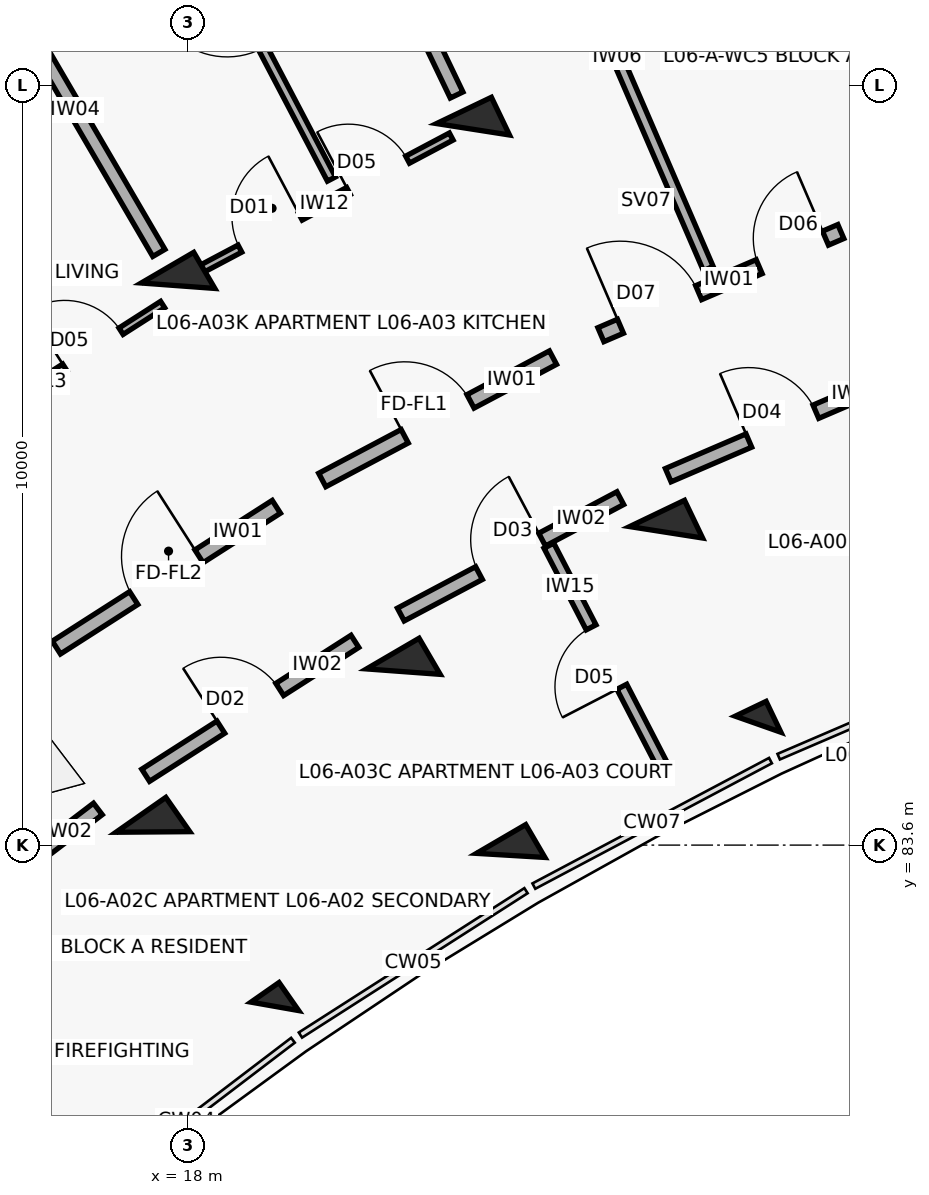
"""IFC4 building model, lengths in metres.
Left out: names, types, materials, properties, quantities, classifications, styles, units other than length and angle.
Written with IfcOpenShell. Run it as: python <this file> out.ifc"""

import sys

from ifc_helpers import new_model, si_unit, direction, frame, frame_2d, origin, origin_2d, place, context, subcontext, project, spatial, rectangle, extrude, element, fill, save


model = new_model("IFC4")
c1 = context("Model", 3, precision=1e-05, world=origin(), true_north=direction((0.0, 1.0)))
c2 = subcontext(c1, "Body", "Model", "MODEL_VIEW")
j1 = project(units=[si_unit("LENGTHUNIT", "METRE"), si_unit("PLANEANGLEUNIT", "RADIAN")], contexts=[c1])
p1 = place(None, origin())
s1 = spatial("IfcSite", under=j1, at=p1, CompositionType="ELEMENT")
p2 = place(p1, origin())
s2 = spatial("IfcBuilding", under=s1, at=p2, CompositionType="ELEMENT")
p3 = place(p2, frame((0.0, 0.0, 20.5)))
s3 = spatial("IfcBuildingStorey", under=s2, at=p3, CompositionType="ELEMENT", Elevation=20.5)
p4 = place(p3, frame((19.146, 81.478, 0.0), z_axis=(0.0, 0.0, 1.0), x_axis=(-0.573004420611, 0.819552276527, 0.0)))
e1 = element("IfcColumn", 1, at=p4, inside=s3, PredefinedType="COLUMN", context=c2, shape_type="SweptSolid", body=[
    extrude(rectangle(XDim=0.45, YDim=0.45, at=origin_2d()), origin(), (0.0, 0.0, 1.0), 3.1),
])
p5 = place(p3, frame((17.542, 83.773, 0.0), z_axis=(0.0, 0.0, 1.0), x_axis=(-0.573004420611, 0.819552276527, 0.0)))
e2 = element("IfcColumn", 2, at=p5, inside=s3, PredefinedType="COLUMN", context=c2, shape_type="SweptSolid", body=[
    extrude(rectangle(XDim=0.55, YDim=0.8, at=origin_2d()), origin(), (0.0, 0.0, 1.0), 3.1),
])
p6 = place(p3, frame((22.249, 83.464, 0.0), z_axis=(0.0, 0.0, 1.0), x_axis=(-0.504226211181, 0.863571611366, 0.0)))
e3 = element("IfcColumn", 3, at=p6, inside=s3, PredefinedType="COLUMN", context=c2, shape_type="SweptSolid", body=[
    extrude(rectangle(XDim=0.5, YDim=0.75, at=origin_2d()), origin(), (0.0, 0.0, 1.0), 3.1),
])
for number, where, z_axis, x_axis in (
    (4, (20.837, 85.882, 0.0), (0.0, 0.0, 1.0), (-0.504, 0.864, 0.0)),
    (5, (17.873, 90.96, 0.0), (0.0, 0.0, 1.0), (-0.504, 0.864, 0.0)),
):
    element("IfcColumn", number, at=place(p3, frame(where, z_axis=z_axis, x_axis=x_axis)), inside=s3, PredefinedType="COLUMN", context=c2, shape_type="SweptSolid", body=[
        extrude(rectangle(XDim=0.55, YDim=0.8, at=origin_2d()), origin(), (0.0, 0.0, 1.0), 3.1),
    ])
p7 = place(p3, frame((25.504, 85.191, 0.0), z_axis=(0.0, 0.0, 1.0), x_axis=(-0.432085748802, 0.901832526405, 0.0)))
e6 = element("IfcColumn", 6, at=p7, inside=s3, PredefinedType="COLUMN", context=c2, shape_type="SweptSolid", body=[
    extrude(rectangle(XDim=0.45, YDim=0.45, at=origin_2d()), origin(), (0.0, 0.0, 1.0), 3.1),
])
for number, where, z_axis, x_axis in (
    (7, (24.294, 87.716, 0.0), (0.0, 0.0, 1.0), (-0.432, 0.902, 0.0)),
    (8, (21.754, 93.019, 0.0), (0.0, 0.0, 1.0), (-0.432, 0.902, 0.0)),
):
    element("IfcColumn", number, at=place(p3, frame(where, z_axis=z_axis, x_axis=x_axis)), inside=s3, PredefinedType="COLUMN", context=c2, shape_type="SweptSolid", body=[
        extrude(rectangle(XDim=0.55, YDim=0.8, at=origin_2d()), origin(), (0.0, 0.0, 1.0), 3.1),
    ])
p8 = place(p3, frame((14.329, 82.18, 0.0), z_axis=(0.0, 0.0, 1.0), x_axis=(0.795501577908, 0.605951515838, 0.0)))
e9 = element("IfcWall", 9, at=p8, inside=s3, PredefinedType="SOLIDWALL", context=c2, shape_type="SweptSolid", body=[
    extrude(rectangle(XDim=3.129, YDim=0.19, at=frame_2d((1.564, 0.0))), origin(), (0.0, 0.0, 1.0), 2.08),
])
p9 = place(p8, frame((1.004, 0.0, 0.0)))
e10 = element("IfcOpeningElement", 10, at=p9, cuts=e9, PredefinedType="OPENING", context=c2, shape_type="SweptSolid", body=[
    extrude(rectangle(XDim=1.12, YDim=2.15, at=frame_2d((0.56, 1.075))), frame((0.0, 0.105, 0.0), z_axis=(0.0, -1.0, 0.0), x_axis=(1.0, 0.0, 0.0)), (0.0, 0.0, 1.0), 0.21),
])
p10 = place(p3, frame((16.272, 86.199, 0.0), z_axis=(0.0, 0.0, 1.0), x_axis=(0.842257205985, 0.539075874963, 0.0)))
e11 = element("IfcWall", 11, at=p10, inside=s3, PredefinedType="SOLIDWALL", context=c2, shape_type="SweptSolid", body=[
    extrude(rectangle(XDim=3.436, YDim=0.2, at=frame_2d((1.718, 0.0))), origin(), (0.0, 0.0, 1.0), 2.08),
])
p11 = place(p10, frame((1.208, 0.0, 0.0)))
e12 = element("IfcOpeningElement", 12, at=p11, cuts=e11, PredefinedType="OPENING", context=c2, shape_type="SweptSolid", body=[
    extrude(rectangle(XDim=1.02, YDim=2.15, at=frame_2d((0.51, 1.075))), frame((0.0, 0.11, 0.0), z_axis=(0.0, -1.0, 0.0), x_axis=(1.0, 0.0, 0.0)), (0.0, 0.0, 1.0), 0.22),
])
p12 = place(p3, frame((17.447, 84.519, 0.0), z_axis=(0.0, 0.0, 1.0), x_axis=(0.842225276846, 0.539125758095, 0.0)))
e13 = element("IfcWall", 13, at=p12, inside=s3, PredefinedType="SOLIDWALL", context=c2, shape_type="SweptSolid", body=[
    extrude(rectangle(XDim=3.269, YDim=0.19, at=frame_2d((1.634, 0.0))), origin(), (0.0, 0.0, 1.0), 2.08),
])
p13 = place(p12, frame((1.174, 0.0, 0.0)))
e14 = element("IfcOpeningElement", 14, at=p13, cuts=e13, PredefinedType="OPENING", context=c2, shape_type="SweptSolid", body=[
    extrude(rectangle(XDim=0.92, YDim=2.1, at=frame_2d((0.46, 1.05))), frame((0.0, 0.105, 0.0), z_axis=(0.0, -1.0, 0.0), x_axis=(1.0, 0.0, 0.0)), (0.0, 0.0, 1.0), 0.21),
])
p14 = place(p3, frame((14.482, 88.672, 0.0), z_axis=(0.0, 0.0, 1.0), x_axis=(0.842245628842, 0.539093962771, 0.0)))
e15 = element("IfcWall", 15, at=p14, inside=s3, PredefinedType="PARTITIONING", context=c2, shape_type="SweptSolid", body=[
    extrude(rectangle(XDim=3.785, YDim=0.1, at=frame_2d((1.893, 0.0))), origin(), (0.0, 0.0, 1.0), 2.08),
])
p15 = place(p14, frame((0.65, 0.0, 0.0)))
e16 = element("IfcOpeningElement", 16, at=p15, cuts=e15, PredefinedType="OPENING", context=c2, shape_type="SweptSolid", body=[
    extrude(rectangle(XDim=0.9, YDim=2.1, at=frame_2d((0.45, 1.05))), frame((0.0, 0.06, 0.0), z_axis=(0.0, -1.0, 0.0), x_axis=(1.0, 0.0, 0.0)), (0.0, 0.0, 1.0), 0.12),
])
p16 = place(p14, frame((2.255, 0.0, 0.0)))
e17 = element("IfcOpeningElement", 17, at=p16, cuts=e15, PredefinedType="OPENING", context=c2, shape_type="SweptSolid", body=[
    extrude(rectangle(XDim=0.88, YDim=2.1, at=frame_2d((0.44, 1.05))), frame((0.0, 0.06, 0.0), z_axis=(0.0, -1.0, 0.0), x_axis=(1.0, 0.0, 0.0)), (0.0, 0.0, 1.0), 0.12),
])
p17 = place(p3, frame((19.77, 88.404, 0.0), z_axis=(0.0, 0.0, 1.0), x_axis=(0.883410853063, 0.468599258099, 0.0)))
e18 = element("IfcWall", 18, at=p17, inside=s3, PredefinedType="SOLIDWALL", context=c2, shape_type="SweptSolid", body=[
    extrude(rectangle(XDim=3.436, YDim=0.2, at=frame_2d((1.718, 0.0))), origin(), (0.0, 0.0, 1.0), 2.08),
])
p18 = place(p17, frame((1.228, 0.0, 0.0)))
e19 = element("IfcOpeningElement", 19, at=p18, cuts=e18, PredefinedType="OPENING", context=c2, shape_type="SweptSolid", body=[
    extrude(rectangle(XDim=0.98, YDim=2.15, at=frame_2d((0.49, 1.075))), frame((0.0, 0.11, 0.0), z_axis=(0.0, -1.0, 0.0), x_axis=(1.0, 0.0, 0.0)), (0.0, 0.0, 1.0), 0.22),
])
p19 = place(p3, frame((20.804, 86.634, 0.0), z_axis=(0.0, 0.0, 1.0), x_axis=(0.883444301944, 0.468536194293, 0.0)))
e20 = element("IfcWall", 20, at=p19, inside=s3, PredefinedType="SOLIDWALL", context=c2, shape_type="SweptSolid", body=[
    extrude(rectangle(XDim=3.269, YDim=0.19, at=frame_2d((1.634, 0.0))), origin(), (0.0, 0.0, 1.0), 2.08),
])
p20 = place(p19, frame((1.164, 0.0, 0.0)))
e21 = element("IfcOpeningElement", 21, at=p20, cuts=e20, PredefinedType="OPENING", context=c2, shape_type="SweptSolid", body=[
    extrude(rectangle(XDim=0.94, YDim=2.1, at=frame_2d((0.47, 1.05))), frame((0.0, 0.105, 0.0), z_axis=(0.0, -1.0, 0.0), x_axis=(1.0, 0.0, 0.0)), (0.0, 0.0, 1.0), 0.21),
])
p21 = place(p3, frame((24.267, 84.608, 0.0), z_axis=(0.0, 0.0, 1.0), x_axis=(-0.459217611894, 0.888323806349, 0.0)))
e22 = element("IfcWall", 22, at=p21, inside=s3, PredefinedType="PARTITIONING", context=c2, shape_type="SweptSolid", body=[
    extrude(rectangle(XDim=3.3, YDim=0.145, at=frame_2d((1.65, 0.0))), origin(), (0.0, 0.0, 1.0), 2.08),
])
p22 = place(p21, frame((1.21, 0.0, 0.0)))
e23 = element("IfcOpeningElement", 23, at=p22, cuts=e22, PredefinedType="OPENING", context=c2, shape_type="SweptSolid", body=[
    extrude(rectangle(XDim=0.88, YDim=2.1, at=frame_2d((0.44, 1.05))), frame((0.0, 0.083, 0.0), z_axis=(0.0, -1.0, 0.0), x_axis=(1.0, 0.0, 0.0)), (0.0, 0.0, 1.0), 0.165),
])
p23 = place(p3, frame((18.113, 91.144, 0.0), z_axis=(0.0, 0.0, 1.0), x_axis=(0.88341855112, 0.46858474531, 0.0)))
e24 = element("IfcWall", 24, at=p23, inside=s3, PredefinedType="PARTITIONING", context=c2, shape_type="SweptSolid", body=[
    extrude(rectangle(XDim=3.797, YDim=0.105, at=frame_2d((1.898, 0.0))), origin(), (0.0, 0.0, 1.0), 2.08),
])
p24 = place(p23, frame((0.65, 0.0, 0.0)))
e25 = element("IfcOpeningElement", 25, at=p24, cuts=e24, PredefinedType="OPENING", context=c2, shape_type="SweptSolid", body=[
    extrude(rectangle(XDim=0.9, YDim=2.1, at=frame_2d((0.45, 1.05))), frame((0.0, 0.062, 0.0), z_axis=(0.0, -1.0, 0.0), x_axis=(1.0, 0.0, 0.0)), (0.0, 0.0, 1.0), 0.125),
])
p25 = place(p23, frame((2.267, 0.0, 0.0)))
e26 = element("IfcOpeningElement", 26, at=p25, cuts=e24, PredefinedType="OPENING", context=c2, shape_type="SweptSolid", body=[
    extrude(rectangle(XDim=0.88, YDim=2.1, at=frame_2d((0.44, 1.05))), frame((0.0, 0.062, 0.0), z_axis=(0.0, -1.0, 0.0), x_axis=(1.0, 0.0, 0.0)), (0.0, 0.0, 1.0), 0.125),
])
p26 = place(p3, frame((19.891, 92.364, 0.0), z_axis=(0.0, 0.0, 1.0), x_axis=(-0.464567298878, 0.885537816704, 0.0)))
e27 = element("IfcWall", 27, at=p26, inside=s3, PredefinedType="PARTITIONING", context=c2, shape_type="SweptSolid", body=[
    extrude(rectangle(XDim=4.9, YDim=0.12, at=frame_2d((2.45, 0.0))), origin(), (0.0, 0.0, 1.0), 2.08),
])
p27 = place(p26, frame((1.945, 0.0, 0.0)))
e28 = element("IfcOpeningElement", 28, at=p27, cuts=e27, PredefinedType="OPENING", context=c2, shape_type="SweptSolid", body=[
    extrude(rectangle(XDim=1.01, YDim=2.1, at=frame_2d((0.505, 1.05))), frame((0.0, 0.07, 0.0), z_axis=(0.0, -1.0, 0.0), x_axis=(1.0, 0.0, 0.0)), (0.0, 0.0, 1.0), 0.14),
])
p28 = place(p3, frame((17.621, 91.392, 0.0), z_axis=(0.0, 0.0, 1.0), x_axis=(-0.504216452091, 0.863577309475, 0.0)))
e29 = element("IfcWall", 29, at=p28, inside=s3, PredefinedType="SOLIDWALL", context=c2, shape_type="SweptSolid", body=[
    extrude(rectangle(XDim=4.35, YDim=0.185, at=frame_2d((2.175, 0.0))), origin(), (0.0, 0.0, 1.0), 2.08),
])
p29 = place(p3, frame((23.437, 90.316, 0.0), z_axis=(0.0, 0.0, 1.0), x_axis=(0.918718172399, 0.394913813008, 0.0)))
e30 = element("IfcWall", 30, at=p29, inside=s3, PredefinedType="SOLIDWALL", context=c2, shape_type="SweptSolid", body=[
    extrude(rectangle(XDim=3.436, YDim=0.2, at=frame_2d((1.718, 0.0))), origin(), (0.0, 0.0, 1.0), 2.08),
])
p30 = place(p29, frame((0.28, 0.0, 0.0)))
e31 = element("IfcOpeningElement", 31, at=p30, cuts=e30, PredefinedType="OPENING", context=c2, shape_type="SweptSolid", body=[
    extrude(rectangle(XDim=1.12, YDim=2.15, at=frame_2d((0.56, 1.075))), frame((0.0, 0.11, 0.0), z_axis=(0.0, -1.0, 0.0), x_axis=(1.0, 0.0, 0.0)), (0.0, 0.0, 1.0), 0.22),
])
p31 = place(p29, frame((2.266, 0.0, 0.0)))
e32 = element("IfcOpeningElement", 32, at=p31, cuts=e30, PredefinedType="OPENING", context=c2, shape_type="SweptSolid", body=[
    extrude(rectangle(XDim=0.95, YDim=2.1, at=frame_2d((0.475, 1.05))), frame((0.0, 0.11, 0.0), z_axis=(0.0, -1.0, 0.0), x_axis=(1.0, 0.0, 0.0)), (0.0, 0.0, 1.0), 0.22),
])
p32 = place(p3, frame((24.322, 88.467, 0.0), z_axis=(0.0, 0.0, 1.0), x_axis=(0.918723391052, 0.394901672235, 0.0)))
e33 = element("IfcWall", 33, at=p32, inside=s3, PredefinedType="SOLIDWALL", context=c2, shape_type="SweptSolid", body=[
    extrude(rectangle(XDim=3.269, YDim=0.19, at=frame_2d((1.634, 0.0))), origin(), (0.0, 0.0, 1.0), 2.08),
])
p33 = place(p32, frame((1.154, 0.0, 0.0)))
e34 = element("IfcOpeningElement", 34, at=p33, cuts=e33, PredefinedType="OPENING", context=c2, shape_type="SweptSolid", body=[
    extrude(rectangle(XDim=0.96, YDim=2.1, at=frame_2d((0.48, 1.05))), frame((0.0, 0.105, 0.0), z_axis=(0.0, -1.0, 0.0), x_axis=(1.0, 0.0, 0.0)), (0.0, 0.0, 1.0), 0.21),
])
p34 = place(p3, frame((24.849, 91.187, 0.0), z_axis=(0.0, 0.0, 1.0), x_axis=(-0.396278945437, 0.91813016365, 0.0)))
e35 = element("IfcWall", 35, at=p34, inside=s3, PredefinedType="PARTITIONING", context=c2, shape_type="SweptSolid", body=[
    extrude(rectangle(XDim=7.95, YDim=0.14, at=frame_2d((3.975, 0.0))), origin(), (0.0, 0.0, 1.0), 2.08),
])
p35 = place(p34, frame((6.05, 0.0, 0.0)))
e36 = element("IfcOpeningElement", 36, at=p35, cuts=e35, PredefinedType="OPENING", context=c2, shape_type="SweptSolid", body=[
    extrude(rectangle(XDim=0.92, YDim=2.1, at=frame_2d((0.46, 1.05))), frame((0.0, 0.08, 0.0), z_axis=(0.0, -1.0, 0.0), x_axis=(1.0, 0.0, 0.0)), (0.0, 0.0, 1.0), 0.16),
])
p36 = place(p3, frame((21.538, 93.469, 0.0), z_axis=(0.0, 0.0, 1.0), x_axis=(-0.432086898897, 0.901831975371, 0.0)))
e37 = element("IfcWall", 37, at=p36, inside=s3, PredefinedType="SOLIDWALL", context=c2, shape_type="SweptSolid", body=[
    extrude(rectangle(XDim=4.35, YDim=0.185, at=frame_2d((2.175, 0.0))), origin(), (0.0, 0.0, 1.0), 2.08),
])
p37 = place(p11, origin())
e38 = element("IfcDoor", 38, at=p37, inside=s3, OperationType="SINGLE_SWING_RIGHT", PredefinedType="DOOR", context=c2, shape_type="SweptSolid", body=[
    extrude(rectangle(XDim=1.02, YDim=2.15, at=frame_2d((0.51, 1.075))), frame((0.0, 0.025, 0.0), z_axis=(0.0, -1.0, 0.0), x_axis=(1.0, 0.0, 0.0)), (0.0, 0.0, 1.0), 0.05),
])
fill(e12, e38)
p38 = place(p13, origin())
e39 = element("IfcDoor", 39, at=p38, inside=s3, OperationType="SINGLE_SWING_LEFT", PredefinedType="DOOR", context=c2, shape_type="SweptSolid", body=[
    extrude(rectangle(XDim=0.92, YDim=2.1, at=frame_2d((0.46, 1.05))), frame((0.0, 0.025, 0.0), z_axis=(0.0, -1.0, 0.0), x_axis=(1.0, 0.0, 0.0)), (0.0, 0.0, 1.0), 0.05),
])
fill(e14, e39)
p39 = place(p16, origin())
e40 = element("IfcDoor", 40, at=p39, inside=s3, OperationType="SINGLE_SWING_LEFT", PredefinedType="DOOR", context=c2, shape_type="SweptSolid", body=[
    extrude(rectangle(XDim=0.88, YDim=2.1, at=frame_2d((0.44, 1.05))), frame((0.0, 0.025, 0.0), z_axis=(0.0, -1.0, 0.0), x_axis=(1.0, 0.0, 0.0)), (0.0, 0.0, 1.0), 0.05),
])
fill(e17, e40)
p40 = place(p18, origin())
e41 = element("IfcDoor", 41, at=p40, inside=s3, OperationType="SINGLE_SWING_LEFT", PredefinedType="DOOR", context=c2, shape_type="SweptSolid", body=[
    extrude(rectangle(XDim=0.98, YDim=2.15, at=frame_2d((0.49, 1.075))), frame((0.0, 0.025, 0.0), z_axis=(0.0, -1.0, 0.0), x_axis=(1.0, 0.0, 0.0)), (0.0, 0.0, 1.0), 0.05),
])
fill(e19, e41)
p41 = place(p20, origin())
e42 = element("IfcDoor", 42, at=p41, inside=s3, OperationType="SINGLE_SWING_RIGHT", PredefinedType="DOOR", context=c2, shape_type="SweptSolid", body=[
    extrude(rectangle(XDim=0.94, YDim=2.1, at=frame_2d((0.47, 1.05))), frame((0.0, 0.025, 0.0), z_axis=(0.0, -1.0, 0.0), x_axis=(1.0, 0.0, 0.0)), (0.0, 0.0, 1.0), 0.05),
])
fill(e21, e42)
p42 = place(p22, origin())
e43 = element("IfcDoor", 43, at=p42, inside=s3, OperationType="SINGLE_SWING_LEFT", PredefinedType="DOOR", context=c2, shape_type="SweptSolid", body=[
    extrude(rectangle(XDim=0.88, YDim=2.1, at=frame_2d((0.44, 1.05))), frame((0.0, 0.025, 0.0), z_axis=(0.0, -1.0, 0.0), x_axis=(1.0, 0.0, 0.0)), (0.0, 0.0, 1.0), 0.05),
])
fill(e23, e43)
p43 = place(p24, origin())
e44 = element("IfcDoor", 44, at=p43, inside=s3, OperationType="SINGLE_SWING_RIGHT", PredefinedType="DOOR", context=c2, shape_type="SweptSolid", body=[
    extrude(rectangle(XDim=0.9, YDim=2.1, at=frame_2d((0.45, 1.05))), frame((0.0, 0.025, 0.0), z_axis=(0.0, -1.0, 0.0), x_axis=(1.0, 0.0, 0.0)), (0.0, 0.0, 1.0), 0.05),
])
fill(e25, e44)
p44 = place(p25, origin())
e45 = element("IfcDoor", 45, at=p44, inside=s3, OperationType="SINGLE_SWING_LEFT", PredefinedType="DOOR", context=c2, shape_type="SweptSolid", body=[
    extrude(rectangle(XDim=0.88, YDim=2.1, at=frame_2d((0.44, 1.05))), frame((0.0, 0.025, 0.0), z_axis=(0.0, -1.0, 0.0), x_axis=(1.0, 0.0, 0.0)), (0.0, 0.0, 1.0), 0.05),
])
fill(e26, e45)
p45 = place(p30, origin())
e46 = element("IfcDoor", 46, at=p45, inside=s3, OperationType="SINGLE_SWING_LEFT", PredefinedType="DOOR", context=c2, shape_type="SweptSolid", body=[
    extrude(rectangle(XDim=1.12, YDim=2.15, at=frame_2d((0.56, 1.075))), frame((0.0, 0.025, 0.0), z_axis=(0.0, -1.0, 0.0), x_axis=(1.0, 0.0, 0.0)), (0.0, 0.0, 1.0), 0.05),
])
fill(e31, e46)
p46 = place(p31, origin())
e47 = element("IfcDoor", 47, at=p46, inside=s3, OperationType="SINGLE_SWING_RIGHT", PredefinedType="DOOR", context=c2, shape_type="SweptSolid", body=[
    extrude(rectangle(XDim=0.95, YDim=2.1, at=frame_2d((0.475, 1.05))), frame((0.0, 0.025, 0.0), z_axis=(0.0, -1.0, 0.0), x_axis=(1.0, 0.0, 0.0)), (0.0, 0.0, 1.0), 0.05),
])
fill(e32, e47)
p47 = place(p33, origin())
e48 = element("IfcDoor", 48, at=p47, inside=s3, OperationType="SINGLE_SWING_LEFT", PredefinedType="DOOR", context=c2, shape_type="SweptSolid", body=[
    extrude(rectangle(XDim=0.96, YDim=2.1, at=frame_2d((0.48, 1.05))), frame((0.0, 0.025, 0.0), z_axis=(0.0, -1.0, 0.0), x_axis=(1.0, 0.0, 0.0)), (0.0, 0.0, 1.0), 0.05),
])
fill(e34, e48)
save(model, sys.argv[1])
